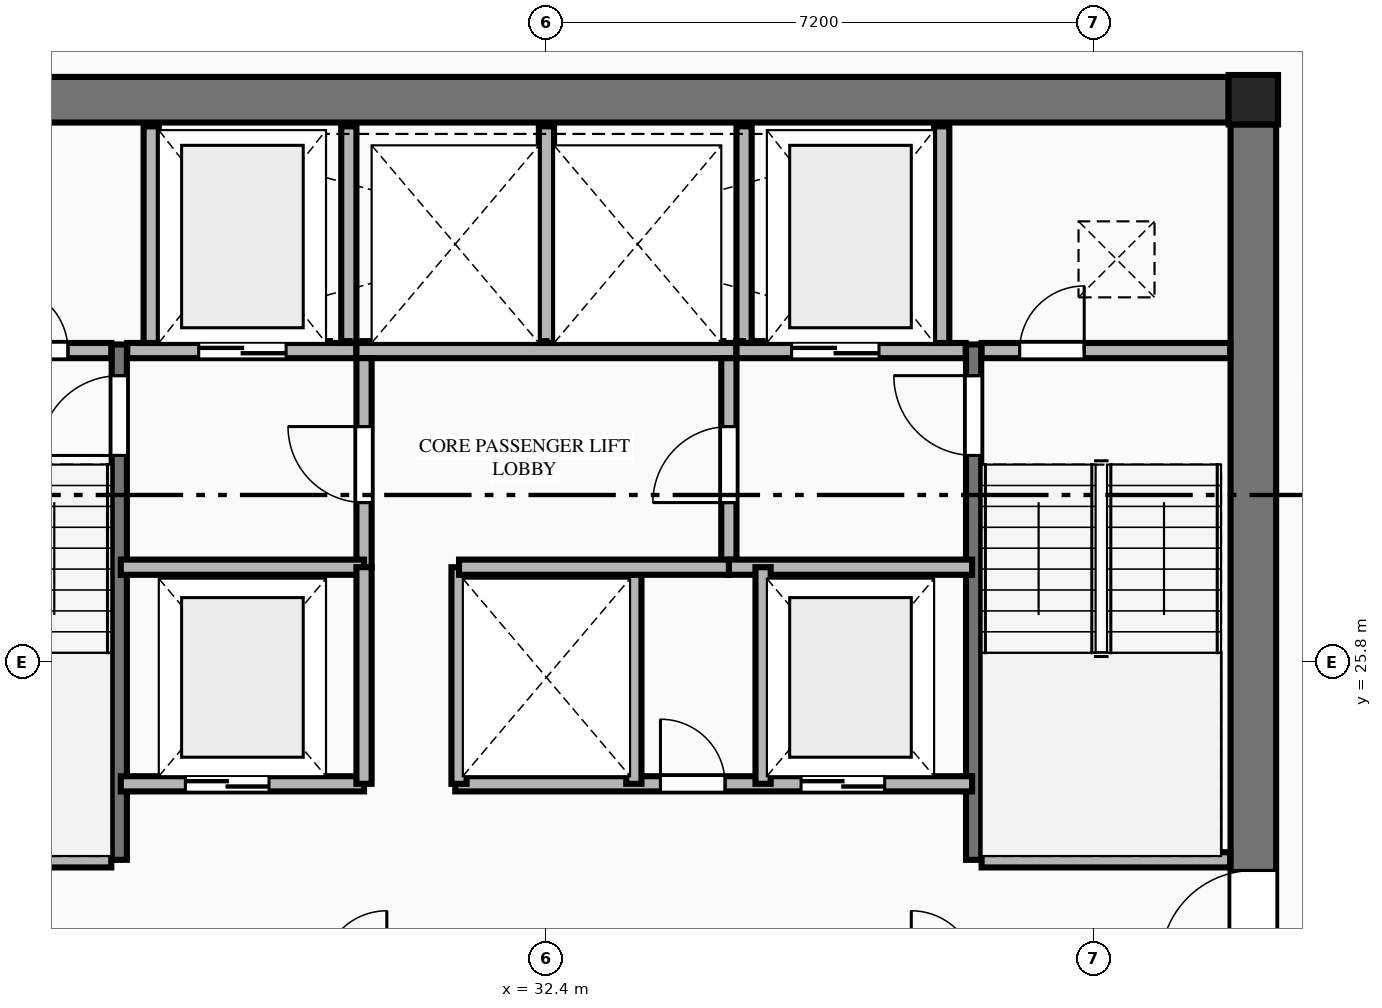
"""IFC4 building model, lengths in metres.
Left out: names, types, materials, properties, quantities, classifications, styles, units other than length and angle.
Written with IfcOpenShell. Run it as: python <this file> out.ifc"""

import sys

from ifc_helpers import new_model, si_unit, direction, frame, frame_2d, origin, origin_2d, place, context, subcontext, project, spatial, rectangle, extrude, element, fill, save


model = new_model("IFC4")
c1 = context("Model", 3, precision=1e-05, world=origin(), true_north=direction((0.0, 1.0)))
c2 = subcontext(c1, "Body", "Model", "MODEL_VIEW")
j1 = project(units=[si_unit("LENGTHUNIT", "METRE"), si_unit("PLANEANGLEUNIT", "RADIAN")], contexts=[c1])
p1 = place(None, origin())
s1 = spatial("IfcSite", under=j1, at=p1, CompositionType="ELEMENT")
p2 = place(p1, origin())
s2 = spatial("IfcBuilding", under=s1, at=p2, CompositionType="ELEMENT")
p3 = place(p2, frame((0.0, 0.0, 160.6)))
s3 = spatial("IfcBuildingStorey", under=s2, at=p3, CompositionType="ELEMENT", Elevation=160.6)
p4 = place(p3, frame((41.7, 33.2, 0.0), z_axis=(0.0, 0.0, 1.0), x_axis=(1.0, 0.0, 0.0)))
e1 = element("IfcColumn", 1, at=p4, inside=s3, PredefinedType="COLUMN", context=c2, shape_type="SweptSolid", body=[
    extrude(rectangle(XDim=0.65, YDim=0.65, at=origin_2d()), origin(), (0.0, 0.0, 1.0), 3.55),
])
p5 = place(p3, frame((23.425, 33.2, 0.0), z_axis=(0.0, 0.0, 1.0), x_axis=(1.0, 0.0, 0.0)))
e2 = element("IfcWall", 2, at=p5, inside=s3, PredefinedType="SHEAR", context=c2, shape_type="SweptSolid", body=[
    extrude(rectangle(XDim=17.95, YDim=0.6, at=frame_2d((8.975, 0.0))), origin(), (0.0, 0.0, 1.0), 3.34),
])
p6 = place(p3, frame((41.7, 18.925, 0.0), z_axis=(0.0, 0.0, 1.0), x_axis=(0.0, 1.0, 0.0)))
e3 = element("IfcWall", 3, at=p6, inside=s3, PredefinedType="SHEAR", context=c2, shape_type="SweptSolid", body=[
    extrude(rectangle(XDim=13.95, YDim=0.6, at=frame_2d((6.975, 0.0))), origin(), (0.0, 0.0, 1.0), 3.34),
])
p7 = place(p6, frame((2.915, 0.0, 0.0)))
e4 = element("IfcOpeningElement", 4, at=p7, cuts=e3, PredefinedType="OPENING", context=c2, shape_type="SweptSolid", body=[
    extrude(rectangle(XDim=1.22, YDim=2.25, at=frame_2d((0.61, 1.125))), frame((0.0, 0.31, 0.0), z_axis=(0.0, -1.0, 0.0), x_axis=(1.0, 0.0, 0.0)), (0.0, 0.0, 1.0), 0.62),
])
p8 = place(p3, frame((26.78, 23.2, 0.0), z_axis=(0.0, 0.0, 1.0), x_axis=(0.0, 1.0, 0.0)))
e5 = element("IfcWall", 5, at=p8, inside=s3, PredefinedType="SHEAR", context=c2, shape_type="SweptSolid", body=[
    extrude(rectangle(XDim=6.78, YDim=0.2, at=frame_2d((3.39, 0.0))), origin(), (0.0, 0.0, 1.0), 3.55),
])
p9 = place(p8, frame((5.32, 0.0, 0.0)))
e6 = element("IfcOpeningElement", 6, at=p9, cuts=e5, PredefinedType="OPENING", context=c2, shape_type="SweptSolid", body=[
    extrude(rectangle(XDim=1.05, YDim=2.15, at=frame_2d((0.525, 1.075))), frame((0.0, 0.11, 0.0), z_axis=(0.0, -1.0, 0.0), x_axis=(1.0, 0.0, 0.0)), (0.0, 0.0, 1.0), 0.22),
])
p10 = place(p3, frame((23.405, 23.2, 0.0), z_axis=(0.0, 0.0, 1.0), x_axis=(1.0, 0.0, 0.0)))
e7 = element("IfcWall", 7, at=p10, inside=s3, PredefinedType="PLUMBINGWALL", context=c2, shape_type="SweptSolid", body=[
    extrude(rectangle(XDim=3.27, YDim=0.2, at=frame_2d((1.635, 0.0))), origin(), (0.0, 0.0, 1.0), 3.34),
])
p11 = place(p3, frame((38.02, 23.2, 0.0), z_axis=(0.0, 0.0, 1.0), x_axis=(0.0, 1.0, 0.0)))
e8 = element("IfcWall", 8, at=p11, inside=s3, PredefinedType="SHEAR", context=c2, shape_type="SweptSolid", body=[
    extrude(rectangle(XDim=6.78, YDim=0.2, at=frame_2d((3.39, 0.0))), origin(), (0.0, 0.0, 1.0), 3.55),
])
p12 = place(p11, frame((5.32, 0.0, 0.0)))
e9 = element("IfcOpeningElement", 9, at=p12, cuts=e8, PredefinedType="OPENING", context=c2, shape_type="SweptSolid", body=[
    extrude(rectangle(XDim=1.05, YDim=2.15, at=frame_2d((0.525, 1.075))), frame((0.0, 0.11, 0.0), z_axis=(0.0, -1.0, 0.0), x_axis=(1.0, 0.0, 0.0)), (0.0, 0.0, 1.0), 0.22),
])
p13 = place(p3, frame((38.125, 23.2, 0.0), z_axis=(0.0, 0.0, 1.0), x_axis=(1.0, 0.0, 0.0)))
e10 = element("IfcWall", 10, at=p13, inside=s3, PredefinedType="PLUMBINGWALL", context=c2, shape_type="SweptSolid", body=[
    extrude(rectangle(XDim=3.27, YDim=0.2, at=frame_2d((1.635, 0.0))), origin(), (0.0, 0.0, 1.0), 3.34),
])
p14 = place(p3, frame((23.405, 29.9, 0.0), z_axis=(0.0, 0.0, 1.0), x_axis=(1.0, 0.0, 0.0)))
e11 = element("IfcWall", 11, at=p14, inside=s3, PredefinedType="PLUMBINGWALL", context=c2, shape_type="SweptSolid", body=[
    extrude(rectangle(XDim=3.27, YDim=0.2, at=frame_2d((1.635, 0.0))), origin(), (0.0, 0.0, 1.0), 3.34),
])
p15 = place(p14, frame((1.85, 0.0, 0.0)))
e12 = element("IfcOpeningElement", 12, at=p15, cuts=e11, PredefinedType="OPENING", context=c2, shape_type="SweptSolid", body=[
    extrude(rectangle(XDim=0.85, YDim=2.05, at=frame_2d((0.425, 1.025))), frame((0.0, 0.11, 0.0), z_axis=(0.0, -1.0, 0.0), x_axis=(1.0, 0.0, 0.0)), (0.0, 0.0, 1.0), 0.22),
])
p16 = place(p3, frame((26.885, 29.9, 0.0), z_axis=(0.0, 0.0, 1.0), x_axis=(1.0, 0.0, 0.0)))
e13 = element("IfcWall", 13, at=p16, inside=s3, PredefinedType="PLUMBINGWALL", context=c2, shape_type="SweptSolid", body=[
    extrude(rectangle(XDim=3.015, YDim=0.2, at=frame_2d((1.507, 0.0))), origin(), (0.0, 0.0, 1.0), 3.34),
])
p17 = place(p16, frame((0.94, 0.0, 0.0)))
e14 = element("IfcOpeningElement", 14, at=p17, cuts=e13, PredefinedType="OPENING", context=c2, shape_type="SweptSolid", body=[
    extrude(rectangle(XDim=1.15, YDim=2.2, at=frame_2d((0.575, 1.1))), frame((0.0, 0.11, 0.0), z_axis=(0.0, -1.0, 0.0), x_axis=(1.0, 0.0, 0.0)), (0.0, 0.0, 1.0), 0.22),
])
p18 = place(p3, frame((29.9, 29.9, 0.0), z_axis=(0.0, 0.0, 1.0), x_axis=(1.0, 0.0, 0.0)))
e15 = element("IfcWall", 15, at=p18, inside=s3, PredefinedType="PLUMBINGWALL", context=c2, shape_type="SweptSolid", body=[
    extrude(rectangle(XDim=5.0, YDim=0.2, at=frame_2d((2.5, 0.0))), origin(), (0.0, 0.0, 1.0), 3.34),
])
p19 = place(p3, frame((34.9, 29.9, 0.0), z_axis=(0.0, 0.0, 1.0), x_axis=(1.0, 0.0, 0.0)))
e16 = element("IfcWall", 16, at=p19, inside=s3, PredefinedType="PLUMBINGWALL", context=c2, shape_type="SweptSolid", body=[
    extrude(rectangle(XDim=3.015, YDim=0.2, at=frame_2d((1.508, 0.0))), origin(), (0.0, 0.0, 1.0), 3.34),
])
p20 = place(p19, frame((0.725, 0.0, 0.0)))
e17 = element("IfcOpeningElement", 17, at=p20, cuts=e16, PredefinedType="OPENING", context=c2, shape_type="SweptSolid", body=[
    extrude(rectangle(XDim=1.15, YDim=2.2, at=frame_2d((0.575, 1.1))), frame((0.0, 0.11, 0.0), z_axis=(0.0, -1.0, 0.0), x_axis=(1.0, 0.0, 0.0)), (0.0, 0.0, 1.0), 0.22),
])
p21 = place(p3, frame((38.125, 29.9, 0.0), z_axis=(0.0, 0.0, 1.0), x_axis=(1.0, 0.0, 0.0)))
e18 = element("IfcWall", 18, at=p21, inside=s3, PredefinedType="PLUMBINGWALL", context=c2, shape_type="SweptSolid", body=[
    extrude(rectangle(XDim=3.27, YDim=0.2, at=frame_2d((1.635, 0.0))), origin(), (0.0, 0.0, 1.0), 3.34),
])
p22 = place(p21, frame((0.5, 0.0, 0.0)))
e19 = element("IfcOpeningElement", 19, at=p22, cuts=e18, PredefinedType="OPENING", context=c2, shape_type="SweptSolid", body=[
    extrude(rectangle(XDim=0.85, YDim=2.05, at=frame_2d((0.425, 1.025))), frame((0.0, 0.11, 0.0), z_axis=(0.0, -1.0, 0.0), x_axis=(1.0, 0.0, 0.0)), (0.0, 0.0, 1.0), 0.22),
])
for number, where, z_axis, x_axis in (
    (20, (27.2, 30.0, 0.0), (0.0, 0.0, 1.0), (0.0, 1.0, 0.0)),
    (21, (29.8, 30.0, 0.0), (0.0, 0.0, 1.0), (0.0, 1.0, 0.0)),
    (22, (32.4, 30.0, 0.0), (0.0, 0.0, 1.0), (0.0, 1.0, 0.0)),
    (23, (35.0, 30.0, 0.0), (0.0, 0.0, 1.0), (0.0, 1.0, 0.0)),
    (24, (37.6, 30.0, 0.0), (0.0, 0.0, 1.0), (0.0, 1.0, 0.0)),
):
    element("IfcWall", number, at=place(p3, frame(where, z_axis=z_axis, x_axis=x_axis)), inside=s3, PredefinedType="PLUMBINGWALL", context=c2, shape_type="SweptSolid", body=[
        extrude(rectangle(XDim=2.85, YDim=0.2, at=frame_2d((1.425, 0.0))), origin(), (0.0, 0.0, 1.0), 3.34),
    ])
p23 = place(p3, frame((30.0, 27.05, 0.0), z_axis=(0.0, 0.0, 1.0), x_axis=(0.0, 1.0, 0.0)))
e25 = element("IfcWall", 25, at=p23, inside=s3, PredefinedType="PLUMBINGWALL", context=c2, shape_type="SweptSolid", body=[
    extrude(rectangle(XDim=2.75, YDim=0.2, at=frame_2d((1.375, 0.0))), origin(), (0.0, 0.0, 1.0), 3.34),
])
p24 = place(p23, frame((0.85, 0.0, 0.0)))
e26 = element("IfcOpeningElement", 26, at=p24, cuts=e25, PredefinedType="OPENING", context=c2, shape_type="SweptSolid", body=[
    extrude(rectangle(XDim=1.0, YDim=2.15, at=frame_2d((0.5, 1.075))), frame((0.0, 0.11, 0.0), z_axis=(0.0, -1.0, 0.0), x_axis=(1.0, 0.0, 0.0)), (0.0, 0.0, 1.0), 0.22),
])
p25 = place(p3, frame((26.8, 27.05, 0.0), z_axis=(0.0, 0.0, 1.0), x_axis=(1.0, 0.0, 0.0)))
e27 = element("IfcWall", 27, at=p25, inside=s3, PredefinedType="PLUMBINGWALL", context=c2, shape_type="SweptSolid", body=[
    extrude(rectangle(XDim=3.2, YDim=0.2, at=frame_2d((1.6, 0.0))), origin(), (0.0, 0.0, 1.0), 3.34),
])
p26 = place(p3, frame((34.8, 27.05, 0.0), z_axis=(0.0, 0.0, 1.0), x_axis=(0.0, 1.0, 0.0)))
e28 = element("IfcWall", 28, at=p26, inside=s3, PredefinedType="PLUMBINGWALL", context=c2, shape_type="SweptSolid", body=[
    extrude(rectangle(XDim=2.75, YDim=0.2, at=frame_2d((1.375, 0.0))), origin(), (0.0, 0.0, 1.0), 3.34),
])
p27 = place(p26, frame((0.85, 0.0, 0.0)))
e29 = element("IfcOpeningElement", 29, at=p27, cuts=e28, PredefinedType="OPENING", context=c2, shape_type="SweptSolid", body=[
    extrude(rectangle(XDim=1.0, YDim=2.15, at=frame_2d((0.5, 1.075))), frame((0.0, 0.11, 0.0), z_axis=(0.0, -1.0, 0.0), x_axis=(1.0, 0.0, 0.0)), (0.0, 0.0, 1.0), 0.22),
])
p28 = place(p3, frame((34.8, 27.05, 0.0), z_axis=(0.0, 0.0, 1.0), x_axis=(1.0, 0.0, 0.0)))
e30 = element("IfcWall", 30, at=p28, inside=s3, PredefinedType="PLUMBINGWALL", context=c2, shape_type="SweptSolid", body=[
    extrude(rectangle(XDim=3.2, YDim=0.2, at=frame_2d((1.6, 0.0))), origin(), (0.0, 0.0, 1.0), 3.34),
])
p29 = place(p3, frame((26.8, 24.2, 0.0), z_axis=(0.0, 0.0, 1.0), x_axis=(1.0, 0.0, 0.0)))
e31 = element("IfcWall", 31, at=p29, inside=s3, PredefinedType="PLUMBINGWALL", context=c2, shape_type="SweptSolid", body=[
    extrude(rectangle(XDim=3.2, YDim=0.2, at=frame_2d((1.6, 0.0))), origin(), (0.0, 0.0, 1.0), 3.34),
])
p30 = place(p29, frame((0.85, 0.0, 0.0)))
e32 = element("IfcOpeningElement", 32, at=p30, cuts=e31, PredefinedType="OPENING", context=c2, shape_type="SweptSolid", body=[
    extrude(rectangle(XDim=1.1, YDim=2.2, at=frame_2d((0.55, 1.1))), frame((0.0, 0.11, 0.0), z_axis=(0.0, -1.0, 0.0), x_axis=(1.0, 0.0, 0.0)), (0.0, 0.0, 1.0), 0.22),
])
p31 = place(p3, frame((30.0, 24.2, 0.0), z_axis=(0.0, 0.0, 1.0), x_axis=(0.0, 1.0, 0.0)))
e33 = element("IfcWall", 33, at=p31, inside=s3, PredefinedType="PLUMBINGWALL", context=c2, shape_type="SweptSolid", body=[
    extrude(rectangle(XDim=2.85, YDim=0.2, at=frame_2d((1.425, 0.0))), origin(), (0.0, 0.0, 1.0), 3.34),
])
p32 = place(p3, frame((31.2, 24.2, 0.0), z_axis=(0.0, 0.0, 1.0), x_axis=(1.0, 0.0, 0.0)))
e34 = element("IfcWall", 34, at=p32, inside=s3, PredefinedType="PLUMBINGWALL", context=c2, shape_type="SweptSolid", body=[
    extrude(rectangle(XDim=6.8, YDim=0.2, at=frame_2d((3.4, 0.0))), origin(), (0.0, 0.0, 1.0), 3.34),
])
p33 = place(p32, frame((2.7, 0.0, 0.0)))
e35 = element("IfcOpeningElement", 35, at=p33, cuts=e34, PredefinedType="OPENING", context=c2, shape_type="SweptSolid", body=[
    extrude(rectangle(XDim=0.85, YDim=2.05, at=frame_2d((0.425, 1.025))), frame((0.0, 0.11, 0.0), z_axis=(0.0, -1.0, 0.0), x_axis=(1.0, 0.0, 0.0)), (0.0, 0.0, 1.0), 0.22),
])
p34 = place(p32, frame((4.55, 0.0, 0.0)))
e36 = element("IfcOpeningElement", 36, at=p34, cuts=e34, PredefinedType="OPENING", context=c2, shape_type="SweptSolid", body=[
    extrude(rectangle(XDim=1.1, YDim=2.2, at=frame_2d((0.55, 1.1))), frame((0.0, 0.11, 0.0), z_axis=(0.0, -1.0, 0.0), x_axis=(1.0, 0.0, 0.0)), (0.0, 0.0, 1.0), 0.22),
])
for number, where, z_axis, x_axis in (
    (37, (31.25, 24.2, 0.0), (0.0, 0.0, 1.0), (0.0, 1.0, 0.0)),
    (38, (33.55, 24.2, 0.0), (0.0, 0.0, 1.0), (0.0, 1.0, 0.0)),
    (39, (35.25, 24.2, 0.0), (0.0, 0.0, 1.0), (0.0, 1.0, 0.0)),
):
    element("IfcWall", number, at=place(p3, frame(where, z_axis=z_axis, x_axis=x_axis)), inside=s3, PredefinedType="PLUMBINGWALL", context=c2, shape_type="SweptSolid", body=[
        extrude(rectangle(XDim=2.85, YDim=0.2, at=frame_2d((1.425, 0.0))), origin(), (0.0, 0.0, 1.0), 3.34),
    ])
p35 = place(p3, frame((31.25, 27.05, 0.0), z_axis=(0.0, 0.0, 1.0), x_axis=(1.0, 0.0, 0.0)))
e40 = element("IfcWall", 40, at=p35, inside=s3, PredefinedType="PLUMBINGWALL", context=c2, shape_type="SweptSolid", body=[
    extrude(rectangle(XDim=3.55, YDim=0.2, at=frame_2d((1.775, 0.0))), origin(), (0.0, 0.0, 1.0), 3.34),
])
p36 = place(p7, origin())
e41 = element("IfcDoor", 41, at=p36, inside=s3, OperationType="SINGLE_SWING_LEFT", PredefinedType="DOOR", context=c2, shape_type="SweptSolid", body=[
    extrude(rectangle(XDim=1.22, YDim=2.25, at=frame_2d((0.61, 1.125))), frame((0.0, 0.025, 0.0), z_axis=(0.0, -1.0, 0.0), x_axis=(1.0, 0.0, 0.0)), (0.0, 0.0, 1.0), 0.05),
])
fill(e4, e41)
p37 = place(p9, origin())
e42 = element("IfcDoor", 42, at=p37, inside=s3, OperationType="SINGLE_SWING_LEFT", PredefinedType="DOOR", context=c2, shape_type="SweptSolid", body=[
    extrude(rectangle(XDim=1.05, YDim=2.15, at=frame_2d((0.525, 1.075))), frame((0.0, 0.025, 0.0), z_axis=(0.0, -1.0, 0.0), x_axis=(1.0, 0.0, 0.0)), (0.0, 0.0, 1.0), 0.05),
])
fill(e6, e42)
p38 = place(p12, origin())
e43 = element("IfcDoor", 43, at=p38, inside=s3, OperationType="SINGLE_SWING_RIGHT", PredefinedType="DOOR", context=c2, shape_type="SweptSolid", body=[
    extrude(rectangle(XDim=1.05, YDim=2.15, at=frame_2d((0.525, 1.075))), frame((0.0, 0.025, 0.0), z_axis=(0.0, -1.0, 0.0), x_axis=(1.0, 0.0, 0.0)), (0.0, 0.0, 1.0), 0.05),
])
fill(e9, e43)
p39 = place(p15, origin())
e44 = element("IfcDoor", 44, at=p39, inside=s3, OperationType="SINGLE_SWING_LEFT", PredefinedType="DOOR", context=c2, shape_type="SweptSolid", body=[
    extrude(rectangle(XDim=0.85, YDim=2.05, at=frame_2d((0.425, 1.025))), frame((0.0, 0.025, 0.0), z_axis=(0.0, -1.0, 0.0), x_axis=(1.0, 0.0, 0.0)), (0.0, 0.0, 1.0), 0.05),
])
fill(e12, e44)
p40 = place(p22, origin())
e45 = element("IfcDoor", 45, at=p40, inside=s3, OperationType="SINGLE_SWING_RIGHT", PredefinedType="DOOR", context=c2, shape_type="SweptSolid", body=[
    extrude(rectangle(XDim=0.85, YDim=2.05, at=frame_2d((0.425, 1.025))), frame((0.0, 0.025, 0.0), z_axis=(0.0, -1.0, 0.0), x_axis=(1.0, 0.0, 0.0)), (0.0, 0.0, 1.0), 0.05),
])
fill(e19, e45)
p41 = place(p17, origin())
e46 = element("IfcDoor", 46, at=p41, inside=s3, OperationType="DOUBLE_DOOR_SLIDING", PredefinedType="DOOR", context=c2, shape_type="SweptSolid", body=[
    extrude(rectangle(XDim=1.15, YDim=2.2, at=frame_2d((0.575, 1.1))), frame((0.0, 0.025, 0.0), z_axis=(0.0, -1.0, 0.0), x_axis=(1.0, 0.0, 0.0)), (0.0, 0.0, 1.0), 0.05),
])
fill(e14, e46)
p42 = place(p20, origin())
e47 = element("IfcDoor", 47, at=p42, inside=s3, OperationType="DOUBLE_DOOR_SLIDING", PredefinedType="DOOR", context=c2, shape_type="SweptSolid", body=[
    extrude(rectangle(XDim=1.15, YDim=2.2, at=frame_2d((0.575, 1.1))), frame((0.0, 0.025, 0.0), z_axis=(0.0, -1.0, 0.0), x_axis=(1.0, 0.0, 0.0)), (0.0, 0.0, 1.0), 0.05),
])
fill(e17, e47)
p43 = place(p24, origin())
e48 = element("IfcDoor", 48, at=p43, inside=s3, OperationType="SINGLE_SWING_RIGHT", PredefinedType="DOOR", context=c2, shape_type="SweptSolid", body=[
    extrude(rectangle(XDim=1.0, YDim=2.15, at=frame_2d((0.5, 1.075))), frame((0.0, 0.025, 0.0), z_axis=(0.0, -1.0, 0.0), x_axis=(1.0, 0.0, 0.0)), (0.0, 0.0, 1.0), 0.05),
])
fill(e26, e48)
p44 = place(p27, origin())
e49 = element("IfcDoor", 49, at=p44, inside=s3, OperationType="SINGLE_SWING_LEFT", PredefinedType="DOOR", context=c2, shape_type="SweptSolid", body=[
    extrude(rectangle(XDim=1.0, YDim=2.15, at=frame_2d((0.5, 1.075))), frame((0.0, 0.025, 0.0), z_axis=(0.0, -1.0, 0.0), x_axis=(1.0, 0.0, 0.0)), (0.0, 0.0, 1.0), 0.05),
])
fill(e29, e49)
p45 = place(p30, origin())
e50 = element("IfcDoor", 50, at=p45, inside=s3, OperationType="DOUBLE_DOOR_SLIDING", PredefinedType="DOOR", context=c2, shape_type="SweptSolid", body=[
    extrude(rectangle(XDim=1.1, YDim=2.2, at=frame_2d((0.55, 1.1))), frame((0.0, 0.025, 0.0), z_axis=(0.0, -1.0, 0.0), x_axis=(1.0, 0.0, 0.0)), (0.0, 0.0, 1.0), 0.05),
])
fill(e32, e50)
p46 = place(p33, origin())
e51 = element("IfcDoor", 51, at=p46, inside=s3, OperationType="SINGLE_SWING_LEFT", PredefinedType="DOOR", context=c2, shape_type="SweptSolid", body=[
    extrude(rectangle(XDim=0.85, YDim=2.05, at=frame_2d((0.425, 1.025))), frame((0.0, 0.025, 0.0), z_axis=(0.0, -1.0, 0.0), x_axis=(1.0, 0.0, 0.0)), (0.0, 0.0, 1.0), 0.05),
])
fill(e35, e51)
p47 = place(p34, origin())
e52 = element("IfcDoor", 52, at=p47, inside=s3, OperationType="DOUBLE_DOOR_SLIDING", PredefinedType="DOOR", context=c2, shape_type="SweptSolid", body=[
    extrude(rectangle(XDim=1.1, YDim=2.2, at=frame_2d((0.55, 1.1))), frame((0.0, 0.025, 0.0), z_axis=(0.0, -1.0, 0.0), x_axis=(1.0, 0.0, 0.0)), (0.0, 0.0, 1.0), 0.05),
])
fill(e36, e52)
save(model, sys.argv[1])
